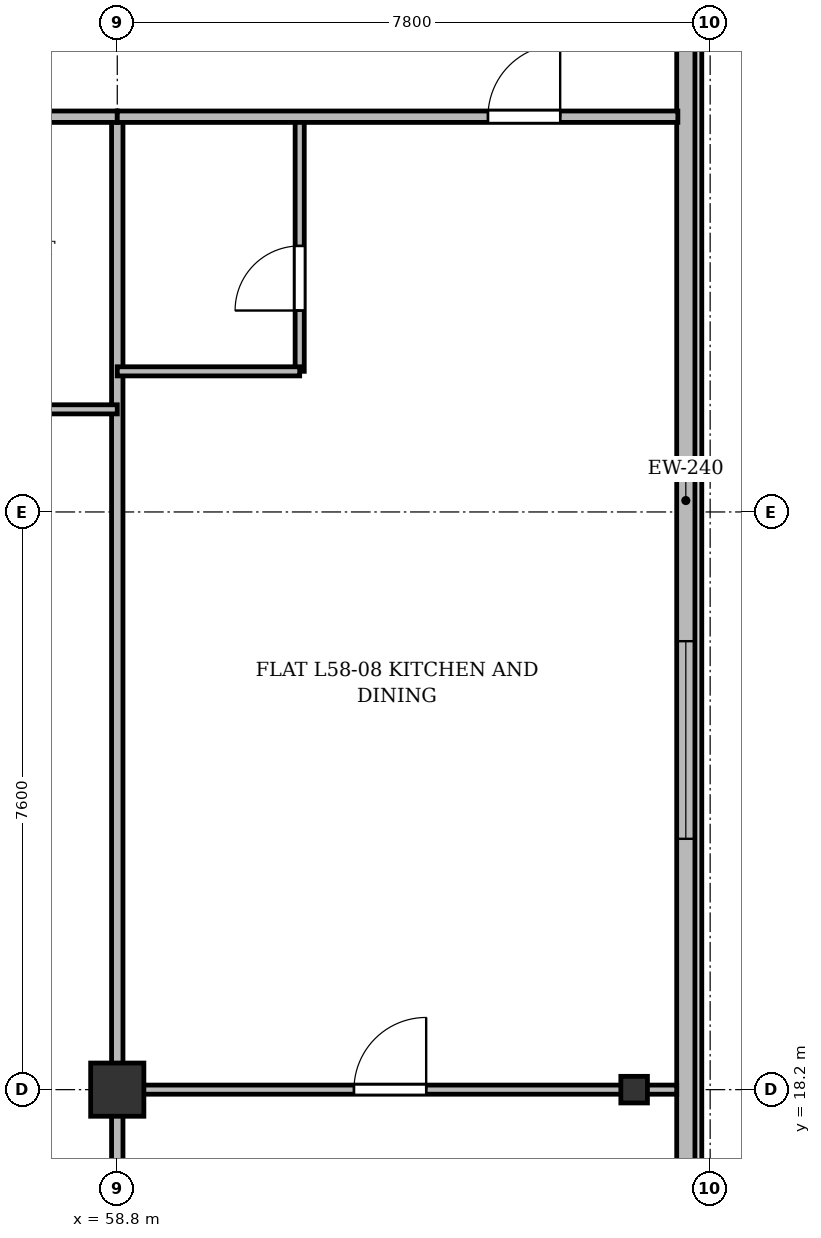
"""IFC4 building model, lengths in metres.
Left out: names, types, materials, properties, quantities, classifications, styles, units other than length and angle.
Written with IfcOpenShell. Run it as: python <this file> out.ifc"""

import sys

from ifc_helpers import new_model, si_unit, direction, frame, frame_2d, origin, origin_2d, place, context, subcontext, project, spatial, rectangle, i_section, extrude, source, transform, mapped, element, fill, save


model = new_model("IFC4")
c1 = context("Model", 3, precision=1e-05, world=origin(), true_north=direction((0.0, 1.0)))
c2 = subcontext(c1, "Body", "Model", "MODEL_VIEW")
j1 = project(units=[si_unit("LENGTHUNIT", "METRE"), si_unit("PLANEANGLEUNIT", "RADIAN")], contexts=[c1])
p1 = place(None, origin())
s1 = spatial("IfcSite", under=j1, at=p1, CompositionType="ELEMENT")
p2 = place(p1, origin())
s2 = spatial("IfcBuilding", under=s1, at=p2, CompositionType="ELEMENT")
p3 = place(p2, frame((0.0, 0.0, 222.9)))
s3 = spatial("IfcBuildingStorey", under=s2, at=p3, CompositionType="ELEMENT", Elevation=222.9)
m1 = source(origin(), c2, "Body", "SweptSolid", [
    extrude(rectangle(XDim=0.7, YDim=0.7, at=origin_2d()), origin(), (0.0, 0.0, 1.0), 3.6),
])
p4 = place(p3, frame((58.8, 18.2, 0.0), z_axis=(0.0, 0.0, 1.0), x_axis=(1.0, 0.0, 0.0)))
e1 = element("IfcColumn", 1, at=p4, inside=s3, PredefinedType="COLUMN", context=c2, shape_type="MappedRepresentation", body=[
    mapped(m1, transform((0.0, 0.0, 0.0), x_axis=(1.0, 0.0, 0.0), y_axis=(0.0, 1.0, 0.0), z_axis=(0.0, 0.0, 1.0), scale=1.0)),
])
m2 = source(origin(), c2, "Body", "SweptSolid", [
    extrude(i_section(OverallWidth=0.35, OverallDepth=0.35, WebThickness=0.018, FlangeThickness=0.028, at=origin_2d()), origin(), (0.0, 0.0, 1.0), 3.6),
])
p5 = place(p3, frame((65.6, 18.2, 0.0), z_axis=(0.0, 0.0, 1.0), x_axis=(1.0, 0.0, 0.0)))
e2 = element("IfcColumn", 2, at=p5, inside=s3, PredefinedType="COLUMN", context=c2, shape_type="MappedRepresentation", body=[
    mapped(m2, transform((0.0, 0.0, 0.0), x_axis=(1.0, 0.0, 0.0), y_axis=(0.0, 1.0, 0.0), z_axis=(0.0, 0.0, 1.0), scale=1.0)),
])
p6 = place(p3, frame((66.28, 45.5, 0.0), z_axis=(0.0, 0.0, 1.0), x_axis=(0.0, -1.0, 0.0)))
e3 = element("IfcWall", 3, at=p6, inside=s3, PredefinedType="SOLIDWALL", context=c2, shape_type="SweptSolid", body=[
    extrude(rectangle(XDim=39.1, YDim=0.24, at=frame_2d((19.55, 0.0))), origin(), (0.0, 0.0, 1.0), 3.36),
])
p7 = place(p6, frame((36.45, 0.0, 0.92)))
e4 = element("IfcOpeningElement", 4, at=p7, cuts=e3, PredefinedType="OPENING", context=c2, shape_type="SweptSolid", body=[
    extrude(rectangle(XDim=1.2, YDim=1.65, at=frame_2d((0.6, 0.825))), frame((0.0, 0.13, 0.0), z_axis=(0.0, -1.0, 0.0), x_axis=(1.0, 0.0, 0.0)), (0.0, 0.0, 1.0), 0.26),
])
p8 = place(p6, frame((32.8, 0.0, 0.92)))
e5 = element("IfcOpeningElement", 5, at=p8, cuts=e3, PredefinedType="OPENING", context=c2, shape_type="SweptSolid", body=[
    extrude(rectangle(XDim=2.6, YDim=1.9, at=frame_2d((1.3, 0.95))), frame((0.0, 0.13, 0.0), z_axis=(0.0, -1.0, 0.0), x_axis=(1.0, 0.0, 0.0)), (0.0, 0.0, 1.0), 0.26),
])
p9 = place(p6, frame((28.6, 0.0, 0.92)))
e6 = element("IfcOpeningElement", 6, at=p9, cuts=e3, PredefinedType="OPENING", context=c2, shape_type="SweptSolid", body=[
    extrude(rectangle(XDim=2.6, YDim=1.9, at=frame_2d((1.3, 0.95))), frame((0.0, 0.13, 0.0), z_axis=(0.0, -1.0, 0.0), x_axis=(1.0, 0.0, 0.0)), (0.0, 0.0, 1.0), 0.26),
])
p10 = place(p6, frame((21.4, 0.0, 0.92)))
e7 = element("IfcOpeningElement", 7, at=p10, cuts=e3, PredefinedType="OPENING", context=c2, shape_type="SweptSolid", body=[
    extrude(rectangle(XDim=2.6, YDim=1.9, at=frame_2d((1.3, 0.95))), frame((0.0, 0.13, 0.0), z_axis=(0.0, -1.0, 0.0), x_axis=(1.0, 0.0, 0.0)), (0.0, 0.0, 1.0), 0.26),
])
p11 = place(p6, frame((7.4, 0.0, 0.92)))
e8 = element("IfcOpeningElement", 8, at=p11, cuts=e3, PredefinedType="OPENING", context=c2, shape_type="SweptSolid", body=[
    extrude(rectangle(XDim=2.6, YDim=1.9, at=frame_2d((1.3, 0.95))), frame((0.0, 0.13, 0.0), z_axis=(0.0, -1.0, 0.0), x_axis=(1.0, 0.0, 0.0)), (0.0, 0.0, 1.0), 0.26),
])
p12 = place(p6, frame((4.5, 0.0, 0.92)))
e9 = element("IfcOpeningElement", 9, at=p12, cuts=e3, PredefinedType="OPENING", context=c2, shape_type="SweptSolid", body=[
    extrude(rectangle(XDim=1.2, YDim=1.65, at=frame_2d((0.6, 0.825))), frame((0.0, 0.13, 0.0), z_axis=(0.0, -1.0, 0.0), x_axis=(1.0, 0.0, 0.0)), (0.0, 0.0, 1.0), 0.26),
])
p13 = place(p6, frame((1.15, 0.0, 0.92)))
e10 = element("IfcOpeningElement", 10, at=p13, cuts=e3, PredefinedType="OPENING", context=c2, shape_type="SweptSolid", body=[
    extrude(rectangle(XDim=1.2, YDim=1.65, at=frame_2d((0.6, 0.825))), frame((0.0, 0.13, 0.0), z_axis=(0.0, -1.0, 0.0), x_axis=(1.0, 0.0, 0.0)), (0.0, 0.0, 1.0), 0.26),
])
p14 = place(p3, frame((58.8, 3.625, 0.0), z_axis=(0.0, 0.0, 1.0), x_axis=(0.0, 1.0, 0.0)))
e11 = element("IfcWall", 11, at=p14, inside=s3, PredefinedType="PARTITIONING", context=c2, shape_type="SweptSolid", body=[
    extrude(rectangle(XDim=27.375, YDim=0.15, at=frame_2d((13.688, 0.0))), origin(), (0.0, 0.0, 1.0), 2.86),
])
p15 = place(p3, frame((51.0, 31.0, 0.0), z_axis=(0.0, 0.0, 1.0), x_axis=(1.0, 0.0, 0.0)))
e12 = element("IfcWall", 12, at=p15, inside=s3, PredefinedType="PARTITIONING", context=c2, shape_type="SweptSolid", body=[
    extrude(rectangle(XDim=7.8, YDim=0.15, at=frame_2d((3.9, 0.0))), origin(), (0.0, 0.0, 1.0), 2.86),
])
p16 = place(p15, frame((3.333, 0.0, 0.0)))
e13 = element("IfcOpeningElement", 13, at=p16, cuts=e12, PredefinedType="OPENING", context=c2, shape_type="SweptSolid", body=[
    extrude(rectangle(XDim=0.95, YDim=2.15, at=frame_2d((0.475, 1.075))), frame((0.0, 0.085, 0.0), z_axis=(0.0, -1.0, 0.0), x_axis=(1.0, 0.0, 0.0)), (0.0, 0.0, 1.0), 0.17),
])
p17 = place(p3, frame((51.0, 27.15, 0.0), z_axis=(0.0, 0.0, 1.0), x_axis=(1.0, 0.0, 0.0)))
e14 = element("IfcWall", 14, at=p17, inside=s3, PredefinedType="PARTITIONING", context=c2, shape_type="SweptSolid", body=[
    extrude(rectangle(XDim=7.8, YDim=0.12, at=frame_2d((3.9, 0.0))), origin(), (0.0, 0.0, 1.0), 2.86),
])
p18 = place(p17, frame((3.333, 0.0, 0.0)))
e15 = element("IfcOpeningElement", 15, at=p18, cuts=e14, PredefinedType="OPENING", context=c2, shape_type="SweptSolid", body=[
    extrude(rectangle(XDim=0.95, YDim=2.15, at=frame_2d((0.475, 1.075))), frame((0.0, 0.07, 0.0), z_axis=(0.0, -1.0, 0.0), x_axis=(1.0, 0.0, 0.0)), (0.0, 0.0, 1.0), 0.14),
])
p19 = place(p3, frame((58.8, 18.2, 0.0), z_axis=(0.0, 0.0, 1.0), x_axis=(1.0, 0.0, 0.0)))
e16 = element("IfcWall", 16, at=p19, inside=s3, PredefinedType="PARTITIONING", context=c2, shape_type="SweptSolid", body=[
    extrude(rectangle(XDim=7.36, YDim=0.12, at=frame_2d((3.68, 0.0))), origin(), (0.0, 0.0, 1.0), 2.91),
])
p20 = place(p19, frame((3.114, 0.0, 0.0)))
e17 = element("IfcOpeningElement", 17, at=p20, cuts=e16, PredefinedType="OPENING", context=c2, shape_type="SweptSolid", body=[
    extrude(rectangle(XDim=0.95, YDim=2.15, at=frame_2d((0.475, 1.075))), frame((0.0, 0.07, 0.0), z_axis=(0.0, -1.0, 0.0), x_axis=(1.0, 0.0, 0.0)), (0.0, 0.0, 1.0), 0.14),
])
p21 = place(p3, frame((61.2, 27.65, 0.0), z_axis=(0.0, 0.0, 1.0), x_axis=(0.0, 1.0, 0.0)))
e18 = element("IfcWall", 18, at=p21, inside=s3, PredefinedType="PARTITIONING", context=c2, shape_type="SweptSolid", body=[
    extrude(rectangle(XDim=3.35, YDim=0.12, at=frame_2d((1.675, 0.0))), origin(), (0.0, 0.0, 1.0), 3.36),
])
p22 = place(p21, frame((0.8, 0.0, 0.0)))
e19 = element("IfcOpeningElement", 19, at=p22, cuts=e18, PredefinedType="OPENING", context=c2, shape_type="SweptSolid", body=[
    extrude(rectangle(XDim=0.85, YDim=2.1, at=frame_2d((0.425, 1.05))), frame((0.0, 0.07, 0.0), z_axis=(0.0, -1.0, 0.0), x_axis=(1.0, 0.0, 0.0)), (0.0, 0.0, 1.0), 0.14),
])
p23 = place(p3, frame((58.8, 27.65, 0.0), z_axis=(0.0, 0.0, 1.0), x_axis=(1.0, 0.0, 0.0)))
e20 = element("IfcWall", 20, at=p23, inside=s3, PredefinedType="PARTITIONING", context=c2, shape_type="SweptSolid", body=[
    extrude(rectangle(XDim=2.4, YDim=0.12, at=frame_2d((1.2, 0.0))), origin(), (0.0, 0.0, 1.0), 2.86),
])
p24 = place(p3, frame((58.8, 31.0, 0.0), z_axis=(0.0, 0.0, 1.0), x_axis=(1.0, 0.0, 0.0)))
e21 = element("IfcWall", 21, at=p24, inside=s3, PredefinedType="PARTITIONING", context=c2, shape_type="SweptSolid", body=[
    extrude(rectangle(XDim=7.375, YDim=0.15, at=frame_2d((3.688, 0.0))), origin(), (0.0, 0.0, 1.0), 2.86),
])
p25 = place(p24, frame((4.877, 0.0, 0.0)))
e22 = element("IfcOpeningElement", 22, at=p25, cuts=e21, PredefinedType="OPENING", context=c2, shape_type="SweptSolid", body=[
    extrude(rectangle(XDim=0.95, YDim=2.15, at=frame_2d((0.475, 1.075))), frame((0.0, 0.085, 0.0), z_axis=(0.0, -1.0, 0.0), x_axis=(1.0, 0.0, 0.0)), (0.0, 0.0, 1.0), 0.17),
])
m3 = source(origin(), c2, "Body", "SweptSolid", [
    extrude(rectangle(XDim=2.6, YDim=1.9, at=frame_2d((1.3, 0.95))), frame((0.0, 0.03, 0.0), z_axis=(0.0, -1.0, 0.0), x_axis=(1.0, 0.0, 0.0)), (0.0, 0.0, 1.0), 0.06),
])
p26 = place(p10, origin())
e23 = element("IfcWindow", 23, at=p26, inside=s3, PartitioningType="SINGLE_PANEL", PredefinedType="WINDOW", context=c2, shape_type="MappedRepresentation", body=[
    mapped(m3, transform((0.0, 0.0, 0.0), x_axis=(1.0, 0.0, 0.0), y_axis=(0.0, 1.0, 0.0), z_axis=(0.0, 0.0, 1.0), scale=1.0)),
])
fill(e7, e23)
m4 = source(origin(), c2, "Body", "SweptSolid", [
    extrude(rectangle(XDim=0.95, YDim=2.15, at=frame_2d((0.475, 1.075))), frame((0.0, 0.025, 0.0), z_axis=(0.0, -1.0, 0.0), x_axis=(1.0, 0.0, 0.0)), (0.0, 0.0, 1.0), 0.05),
])
p27 = place(p20, origin())
e24 = element("IfcDoor", 24, at=p27, inside=s3, OperationType="SINGLE_SWING_RIGHT", PredefinedType="DOOR", context=c2, shape_type="MappedRepresentation", body=[
    mapped(m4, transform((0.0, 0.0, 0.0), x_axis=(1.0, 0.0, 0.0), y_axis=(0.0, 1.0, 0.0), z_axis=(0.0, 0.0, 1.0), scale=1.0)),
])
fill(e17, e24)
m5 = source(origin(), c2, "Body", "SweptSolid", [
    extrude(rectangle(XDim=0.85, YDim=2.1, at=frame_2d((0.425, 1.05))), frame((0.0, 0.025, 0.0), z_axis=(0.0, -1.0, 0.0), x_axis=(1.0, 0.0, 0.0)), (0.0, 0.0, 1.0), 0.05),
])
p28 = place(p22, origin())
e25 = element("IfcDoor", 25, at=p28, inside=s3, OperationType="SINGLE_SWING_LEFT", PredefinedType="DOOR", context=c2, shape_type="MappedRepresentation", body=[
    mapped(m5, transform((0.0, 0.0, 0.0), x_axis=(1.0, 0.0, 0.0), y_axis=(0.0, 1.0, 0.0), z_axis=(0.0, 0.0, 1.0), scale=1.0)),
])
fill(e19, e25)
p29 = place(p25, origin())
e26 = element("IfcDoor", 26, at=p29, inside=s3, OperationType="SINGLE_SWING_RIGHT", PredefinedType="DOOR", context=c2, shape_type="MappedRepresentation", body=[
    mapped(m4, transform((0.0, 0.0, 0.0), x_axis=(1.0, 0.0, 0.0), y_axis=(0.0, 1.0, 0.0), z_axis=(0.0, 0.0, 1.0), scale=1.0)),
])
fill(e22, e26)
save(model, sys.argv[1])
